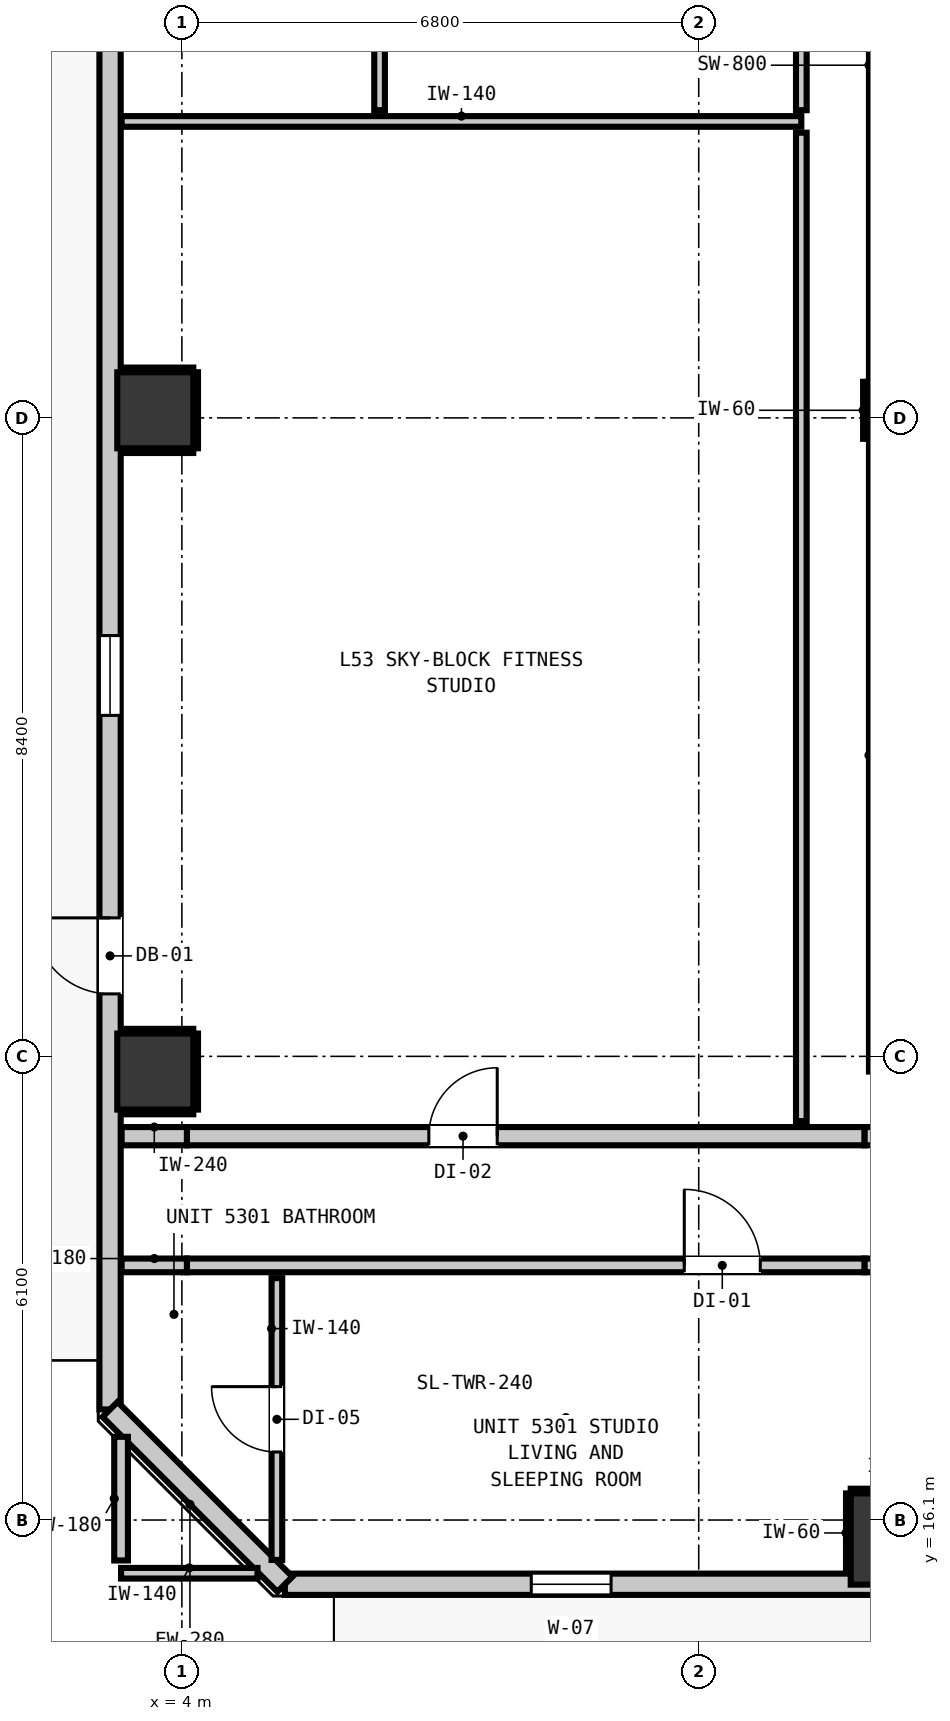
"""IFC4 building model, lengths in metres.
Left out: names, types, materials, properties, quantities, classifications, styles, units other than length and angle.
Written with IfcOpenShell. Run it as: python <this file> out.ifc"""

import sys

from ifc_helpers import new_model, si_unit, direction, frame, frame_2d, origin, origin_2d, place, context, subcontext, project, spatial, rectangle, extrude, element, fill, save


model = new_model("IFC4")
c1 = context("Model", 3, precision=1e-05, world=origin(), true_north=direction((0.0, 1.0)))
c2 = subcontext(c1, "Body", "Model", "MODEL_VIEW")
j1 = project(units=[si_unit("LENGTHUNIT", "METRE"), si_unit("PLANEANGLEUNIT", "RADIAN")], contexts=[c1])
p1 = place(None, origin())
s1 = spatial("IfcSite", under=j1, at=p1, CompositionType="ELEMENT")
p2 = place(p1, origin())
s2 = spatial("IfcBuilding", under=s1, at=p2, CompositionType="ELEMENT")
p3 = place(p2, frame((0.0, 0.0, 183.52)))
s3 = spatial("IfcBuildingStorey", under=s2, at=p3, CompositionType="ELEMENT", Elevation=183.52)
p4 = place(p3, frame((13.4, 30.7, 0.0), z_axis=(0.0, 0.0, 1.0), x_axis=(1.0, 0.0, 0.0)))
e1 = element("IfcColumn", 1, at=p4, inside=s3, PredefinedType="COLUMN", context=c2, shape_type="SweptSolid", body=[
    extrude(rectangle(XDim=0.75, YDim=0.75, at=origin_2d()), origin(), (0.0, 0.0, 1.0), 3.32),
])
p5 = place(p3, frame((13.44, 22.0, 0.0), z_axis=(0.0, 0.0, 1.0), x_axis=(0.0, 1.0, 0.0)))
e2 = element("IfcWall", 2, at=p5, inside=s3, PredefinedType="SHEAR", context=c2, shape_type="SweptSolid", body=[
    extrude(rectangle(XDim=8.32, YDim=0.8, at=frame_2d((4.16, 0.0))), origin(), (0.0, 0.0, 1.0), 3.32),
])
p6 = place(p3, frame((13.44, 31.08, 0.0), z_axis=(0.0, 0.0, 1.0), x_axis=(0.0, 1.0, 0.0)))
e3 = element("IfcWall", 3, at=p6, inside=s3, PredefinedType="SHEAR", context=c2, shape_type="SweptSolid", body=[
    extrude(rectangle(XDim=8.32, YDim=0.8, at=frame_2d((4.16, 0.0))), origin(), (0.0, 0.0, 1.0), 3.32),
])
p7 = place(p3, frame((13.4, 15.85, 0.0), z_axis=(0.0, 0.0, 1.0), x_axis=(1.0, 0.0, 0.0)))
e4 = element("IfcColumn", 4, at=p7, inside=s3, PredefinedType="COLUMN", context=c2, shape_type="SweptSolid", body=[
    extrude(rectangle(XDim=1.2, YDim=1.2, at=origin_2d()), origin(), (0.0, 0.0, 1.0), 3.32),
])
for number, where, z_axis, x_axis in (
    (5, (3.65, 22.0, 0.0), (0.0, 0.0, 1.0), (1.0, 0.0, 0.0)),
    (6, (3.65, 30.7, 0.0), (0.0, 0.0, 1.0), (1.0, 0.0, 0.0)),
):
    element("IfcColumn", number, at=place(p3, frame(where, z_axis=z_axis, x_axis=x_axis)), inside=s3, PredefinedType="COLUMN", context=c2, shape_type="SweptSolid", body=[
        extrude(rectangle(XDim=1.0, YDim=1.0, at=origin_2d()), origin(), (0.0, 0.0, 1.0), 3.32),
    ])
p8 = place(p3, frame((3.055, 17.555, 0.0), z_axis=(0.0, 0.0, 1.0), x_axis=(0.0, 1.0, 0.0)))
e7 = element("IfcWall", 7, at=p8, inside=s3, PredefinedType="STANDARD", context=c2, shape_type="SweptSolid", body=[
    extrude(rectangle(XDim=32.29, YDim=0.28, at=frame_2d((16.145, 0.0))), origin(), (0.0, 0.0, 1.0), 3.08),
])
p9 = place(p8, frame((5.467, 0.0, 0.0)))
e8 = element("IfcOpeningElement", 8, at=p9, cuts=e7, PredefinedType="OPENING", context=c2, shape_type="SweptSolid", body=[
    extrude(rectangle(XDim=1.0, YDim=2.15, at=frame_2d((0.5, 1.075))), frame((0.0, 0.15, 0.0), z_axis=(0.0, -1.0, 0.0), x_axis=(1.0, 0.0, 0.0)), (0.0, 0.0, 1.0), 0.3),
])
p10 = place(p8, frame((30.247, 0.0, 0.85)))
e9 = element("IfcOpeningElement", 9, at=p10, cuts=e7, PredefinedType="OPENING", context=c2, shape_type="SweptSolid", body=[
    extrude(rectangle(XDim=1.05, YDim=1.65, at=frame_2d((0.525, 0.825))), frame((0.0, 0.15, 0.0), z_axis=(0.0, -1.0, 0.0), x_axis=(1.0, 0.0, 0.0)), (0.0, 0.0, 1.0), 0.3),
])
p11 = place(p8, frame((9.131, 0.0, 0.85)))
e10 = element("IfcOpeningElement", 10, at=p11, cuts=e7, PredefinedType="OPENING", context=c2, shape_type="SweptSolid", body=[
    extrude(rectangle(XDim=1.05, YDim=1.65, at=frame_2d((0.525, 0.825))), frame((0.0, 0.15, 0.0), z_axis=(0.0, -1.0, 0.0), x_axis=(1.0, 0.0, 0.0)), (0.0, 0.0, 1.0), 0.3),
])
p12 = place(p3, frame((40.445, 15.255, 0.0), z_axis=(0.0, 0.0, 1.0), x_axis=(-1.0, 0.0, 0.0)))
e11 = element("IfcWall", 11, at=p12, inside=s3, PredefinedType="STANDARD", context=c2, shape_type="SweptSolid", body=[
    extrude(rectangle(XDim=35.09, YDim=0.28, at=frame_2d((17.545, 0.0))), origin(), (0.0, 0.0, 1.0), 3.08),
])
p13 = place(p12, frame((0.904, 0.0, 0.0)))
e12 = element("IfcOpeningElement", 12, at=p13, cuts=e11, PredefinedType="OPENING", context=c2, shape_type="SweptSolid", body=[
    extrude(rectangle(XDim=1.0, YDim=2.15, at=frame_2d((0.5, 1.075))), frame((0.0, 0.15, 0.0), z_axis=(0.0, -1.0, 0.0), x_axis=(1.0, 0.0, 0.0)), (0.0, 0.0, 1.0), 0.3),
])
p14 = place(p12, frame((30.798, 0.0, 0.85)))
e13 = element("IfcOpeningElement", 13, at=p14, cuts=e11, PredefinedType="OPENING", context=c2, shape_type="SweptSolid", body=[
    extrude(rectangle(XDim=1.05, YDim=1.65, at=frame_2d((0.525, 0.825))), frame((0.0, 0.15, 0.0), z_axis=(0.0, -1.0, 0.0), x_axis=(1.0, 0.0, 0.0)), (0.0, 0.0, 1.0), 0.3),
])
p15 = place(p12, frame((14.92, 0.0, 0.85)))
e14 = element("IfcOpeningElement", 14, at=p15, cuts=e11, PredefinedType="OPENING", context=c2, shape_type="SweptSolid", body=[
    extrude(rectangle(XDim=1.05, YDim=1.65, at=frame_2d((0.525, 0.825))), frame((0.0, 0.15, 0.0), z_axis=(0.0, -1.0, 0.0), x_axis=(1.0, 0.0, 0.0)), (0.0, 0.0, 1.0), 0.3),
])
p16 = place(p3, frame((5.355, 15.255, 0.0), z_axis=(0.0, 0.0, 1.0), x_axis=(-0.707106781187, 0.707106781187, 0.0)))
e15 = element("IfcWall", 15, at=p16, inside=s3, PredefinedType="STANDARD", context=c2, shape_type="SweptSolid", body=[
    extrude(rectangle(XDim=3.253, YDim=0.28, at=frame_2d((1.626, 0.0))), origin(), (0.0, 0.0, 1.0), 3.08),
])
p17 = place(p3, frame((3.207, 21.15, 0.0), z_axis=(0.0, 0.0, 1.0), x_axis=(1.0, 0.0, 0.0)))
e16 = element("IfcWall", 16, at=p17, inside=s3, PredefinedType="PARTITIONING", context=c2, shape_type="SweptSolid", body=[
    extrude(rectangle(XDim=0.86, YDim=0.24, at=frame_2d((0.43, 0.0))), origin(), (0.0, 0.0, 1.0), 3.08),
])
p18 = place(p3, frame((4.067, 21.15, 0.0), z_axis=(0.0, 0.0, 1.0), x_axis=(1.0, 0.0, 0.0)))
e17 = element("IfcWall", 17, at=p18, inside=s3, PredefinedType="PARTITIONING", context=c2, shape_type="SweptSolid", body=[
    extrude(rectangle(XDim=8.916, YDim=0.24, at=frame_2d((4.458, 0.0))), origin(), (0.0, 0.0, 1.0), 2.565),
])
p19 = place(p18, frame((3.182, 0.0, 0.0)))
e18 = element("IfcOpeningElement", 18, at=p19, cuts=e17, PredefinedType="OPENING", context=c2, shape_type="SweptSolid", body=[
    extrude(rectangle(XDim=0.9, YDim=2.1, at=frame_2d((0.45, 1.05))), frame((0.0, 0.13, 0.0), z_axis=(0.0, -1.0, 0.0), x_axis=(1.0, 0.0, 0.0)), (0.0, 0.0, 1.0), 0.26),
])
p20 = place(p3, frame((12.983, 21.15, 0.0), z_axis=(0.0, 0.0, 1.0), x_axis=(1.0, 0.0, 0.0)))
e19 = element("IfcWall", 19, at=p20, inside=s3, PredefinedType="PARTITIONING", context=c2, shape_type="SweptSolid", body=[
    extrude(rectangle(XDim=29.61, YDim=0.24, at=frame_2d((14.805, 0.0))), origin(), (0.0, 0.0, 1.0), 3.08),
])
p21 = place(p20, frame((5.227, 0.0, 0.0)))
e20 = element("IfcOpeningElement", 20, at=p21, cuts=e19, PredefinedType="OPENING", context=c2, shape_type="SweptSolid", body=[
    extrude(rectangle(XDim=1.1, YDim=2.15, at=frame_2d((0.55, 1.075))), frame((0.0, 0.13, 0.0), z_axis=(0.0, -1.0, 0.0), x_axis=(1.0, 0.0, 0.0)), (0.0, 0.0, 1.0), 0.26),
])
p22 = place(p20, frame((26.668, 0.0, 0.0)))
e21 = element("IfcOpeningElement", 21, at=p22, cuts=e19, PredefinedType="OPENING", context=c2, shape_type="SweptSolid", body=[
    extrude(rectangle(XDim=1.0, YDim=2.15, at=frame_2d((0.5, 1.075))), frame((0.0, 0.13, 0.0), z_axis=(0.0, -1.0, 0.0), x_axis=(1.0, 0.0, 0.0)), (0.0, 0.0, 1.0), 0.26),
])
p23 = place(p3, frame((3.207, 19.45, 0.0), z_axis=(0.0, 0.0, 1.0), x_axis=(1.0, 0.0, 0.0)))
e22 = element("IfcWall", 22, at=p23, inside=s3, PredefinedType="PARTITIONING", context=c2, shape_type="SweptSolid", body=[
    extrude(rectangle(XDim=0.86, YDim=0.18, at=frame_2d((0.43, 0.0))), origin(), (0.0, 0.0, 1.0), 3.08),
])
p24 = place(p3, frame((4.067, 19.45, 0.0), z_axis=(0.0, 0.0, 1.0), x_axis=(1.0, 0.0, 0.0)))
e23 = element("IfcWall", 23, at=p24, inside=s3, PredefinedType="PARTITIONING", context=c2, shape_type="SweptSolid", body=[
    extrude(rectangle(XDim=8.916, YDim=0.18, at=frame_2d((4.458, 0.0))), origin(), (0.0, 0.0, 1.0), 2.565),
])
p25 = place(p24, frame((6.543, 0.0, 0.0)))
e24 = element("IfcOpeningElement", 24, at=p25, cuts=e23, PredefinedType="OPENING", context=c2, shape_type="SweptSolid", body=[
    extrude(rectangle(XDim=1.0, YDim=2.15, at=frame_2d((0.5, 1.075))), frame((0.0, 0.1, 0.0), z_axis=(0.0, -1.0, 0.0), x_axis=(1.0, 0.0, 0.0)), (0.0, 0.0, 1.0), 0.2),
])
p26 = place(p3, frame((12.983, 19.45, 0.0), z_axis=(0.0, 0.0, 1.0), x_axis=(1.0, 0.0, 0.0)))
e25 = element("IfcWall", 25, at=p26, inside=s3, PredefinedType="PARTITIONING", context=c2, shape_type="SweptSolid", body=[
    extrude(rectangle(XDim=29.61, YDim=0.18, at=frame_2d((14.805, 0.0))), origin(), (0.0, 0.0, 1.0), 3.08),
])
p27 = place(p26, frame((17.403, 0.0, 0.0)))
e26 = element("IfcOpeningElement", 26, at=p27, cuts=e25, PredefinedType="OPENING", context=c2, shape_type="SweptSolid", body=[
    extrude(rectangle(XDim=0.9, YDim=2.1, at=frame_2d((0.45, 1.05))), frame((0.0, 0.1, 0.0), z_axis=(0.0, -1.0, 0.0), x_axis=(1.0, 0.0, 0.0)), (0.0, 0.0, 1.0), 0.2),
])
p28 = place(p3, frame((3.2, 15.4, 0.0), z_axis=(0.0, 0.0, 1.0), x_axis=(1.0, 0.0, 0.0)))
e27 = element("IfcWall", 27, at=p28, inside=s3, PredefinedType="PARTITIONING", context=c2, shape_type="SweptSolid", body=[
    extrude(rectangle(XDim=1.795, YDim=0.14, at=frame_2d((0.897, 0.0))), origin(), (0.0, 0.0, 1.0), 3.08),
])
p29 = place(p3, frame((3.207, 34.5, 0.0), z_axis=(0.0, 0.0, 1.0), x_axis=(1.0, 0.0, 0.0)))
e28 = element("IfcWall", 28, at=p29, inside=s3, PredefinedType="PARTITIONING", context=c2, shape_type="SweptSolid", body=[
    extrude(rectangle(XDim=8.943, YDim=0.14, at=frame_2d((4.471, 0.0))), origin(), (0.0, 0.0, 1.0), 3.08),
])
p30 = place(p3, frame((3.2, 15.568, 0.0), z_axis=(0.0, 0.0, 1.0), x_axis=(0.0, 1.0, 0.0)))
e29 = element("IfcWall", 29, at=p30, inside=s3, PredefinedType="PARTITIONING", context=c2, shape_type="SweptSolid", body=[
    extrude(rectangle(XDim=1.627, YDim=0.18, at=frame_2d((0.813, 0.0))), origin(), (0.0, 0.0, 1.0), 3.08),
])
p31 = place(p3, frame((5.25, 15.575, 0.0), z_axis=(0.0, 0.0, 1.0), x_axis=(0.0, 1.0, 0.0)))
e30 = element("IfcWall", 30, at=p31, inside=s3, PredefinedType="PARTITIONING", context=c2, shape_type="SweptSolid", body=[
    extrude(rectangle(XDim=3.707, YDim=0.14, at=frame_2d((1.854, 0.0))), origin(), (0.0, 0.0, 1.0), 3.08),
])
p32 = place(p31, frame((1.42, 0.0, 0.0)))
e31 = element("IfcOpeningElement", 31, at=p32, cuts=e30, PredefinedType="OPENING", context=c2, shape_type="SweptSolid", body=[
    extrude(rectangle(XDim=0.86, YDim=2.02, at=frame_2d((0.43, 1.01))), frame((0.0, 0.08, 0.0), z_axis=(0.0, -1.0, 0.0), x_axis=(1.0, 0.0, 0.0)), (0.0, 0.0, 1.0), 0.16),
])
p33 = place(p3, frame((6.601, 34.648, 0.0), z_axis=(0.0, 0.0, 1.0), x_axis=(0.0, 1.0, 0.0)))
e32 = element("IfcWall", 32, at=p33, inside=s3, PredefinedType="PARTITIONING", context=c2, shape_type="SweptSolid", body=[
    extrude(rectangle(XDim=5.434, YDim=0.14, at=frame_2d((2.717, 0.0))), origin(), (0.0, 0.0, 1.0), 3.08),
])
p34 = place(p3, frame((12.15, 21.348, 0.0), z_axis=(0.0, 0.0, 1.0), x_axis=(0.0, 1.0, 0.0)))
e33 = element("IfcWall", 33, at=p34, inside=s3, PredefinedType="PARTITIONING", context=c2, shape_type="SweptSolid", body=[
    extrude(rectangle(XDim=13.004, YDim=0.14, at=frame_2d((6.502, 0.0))), origin(), (0.0, 0.0, 1.0), 3.08),
])
p35 = place(p3, frame((12.15, 34.648, 0.0), z_axis=(0.0, 0.0, 1.0), x_axis=(0.0, 1.0, 0.0)))
e34 = element("IfcWall", 34, at=p35, inside=s3, PredefinedType="PARTITIONING", context=c2, shape_type="SweptSolid", body=[
    extrude(rectangle(XDim=5.434, YDim=0.14, at=frame_2d((2.717, 0.0))), origin(), (0.0, 0.0, 1.0), 3.08),
])
p36 = place(p3, frame((12.993, 30.325, 0.0), z_axis=(0.0, 0.0, 1.0), x_axis=(0.0, 1.0, 0.0)))
e35 = element("IfcWall", 35, at=p36, inside=s3, PredefinedType="PARTITIONING", context=c2, shape_type="SweptSolid", body=[
    extrude(rectangle(XDim=0.75, YDim=0.06, at=frame_2d((0.375, 0.0))), origin(), (0.0, 0.0, 1.0), 1.45),
])
p37 = place(p3, frame((12.8, 16.482, 0.0), z_axis=(0.0, 0.0, 1.0), x_axis=(1.0, 0.0, 0.0)))
e36 = element("IfcWall", 36, at=p37, inside=s3, PredefinedType="PARTITIONING", context=c2, shape_type="SweptSolid", body=[
    extrude(rectangle(XDim=1.2, YDim=0.06, at=frame_2d((0.6, 0.0))), origin(), (0.0, 0.0, 1.0), 1.45),
])
p38 = place(p3, frame((12.768, 15.41, 0.0), z_axis=(0.0, 0.0, 1.0), x_axis=(0.0, 1.0, 0.0)))
e37 = element("IfcWall", 37, at=p38, inside=s3, PredefinedType="PARTITIONING", context=c2, shape_type="SweptSolid", body=[
    extrude(rectangle(XDim=1.04, YDim=0.06, at=frame_2d((0.52, 0.0))), origin(), (0.0, 0.0, 1.0), 1.45),
])
for number, where, z_axis, x_axis in (
    (38, (3.21, 21.468, 0.0), (0.0, 0.0, 1.0), (1.0, 0.0, 0.0)),
    (39, (3.21, 22.532, 0.0), (0.0, 0.0, 1.0), (1.0, 0.0, 0.0)),
):
    element("IfcWall", number, at=place(p3, frame(where, z_axis=z_axis, x_axis=x_axis)), inside=s3, PredefinedType="PARTITIONING", context=c2, shape_type="SweptSolid", body=[
        extrude(rectangle(XDim=0.94, YDim=0.06, at=frame_2d((0.47, 0.0))), origin(), (0.0, 0.0, 1.0), 1.45),
    ])
p39 = place(p3, frame((4.182, 21.5, 0.0), z_axis=(0.0, 0.0, 1.0), x_axis=(0.0, 1.0, 0.0)))
e40 = element("IfcWall", 40, at=p39, inside=s3, PredefinedType="PARTITIONING", context=c2, shape_type="SweptSolid", body=[
    extrude(rectangle(XDim=1.0, YDim=0.06, at=frame_2d((0.5, 0.0))), origin(), (0.0, 0.0, 1.0), 1.45),
])
for number, where, z_axis, x_axis in (
    (41, (3.21, 30.168, 0.0), (0.0, 0.0, 1.0), (1.0, 0.0, 0.0)),
    (42, (3.21, 31.232, 0.0), (0.0, 0.0, 1.0), (1.0, 0.0, 0.0)),
):
    element("IfcWall", number, at=place(p3, frame(where, z_axis=z_axis, x_axis=x_axis)), inside=s3, PredefinedType="PARTITIONING", context=c2, shape_type="SweptSolid", body=[
        extrude(rectangle(XDim=0.94, YDim=0.06, at=frame_2d((0.47, 0.0))), origin(), (0.0, 0.0, 1.0), 1.45),
    ])
p40 = place(p3, frame((4.182, 30.2, 0.0), z_axis=(0.0, 0.0, 1.0), x_axis=(0.0, 1.0, 0.0)))
e43 = element("IfcWall", 43, at=p40, inside=s3, PredefinedType="PARTITIONING", context=c2, shape_type="SweptSolid", body=[
    extrude(rectangle(XDim=1.0, YDim=0.06, at=frame_2d((0.5, 0.0))), origin(), (0.0, 0.0, 1.0), 1.45),
])
p41 = place(p9, origin())
e44 = element("IfcDoor", 44, at=p41, inside=s3, OperationType="SINGLE_SWING_RIGHT", PredefinedType="DOOR", context=c2, shape_type="SweptSolid", body=[
    extrude(rectangle(XDim=1.0, YDim=2.15, at=frame_2d((0.5, 1.075))), frame((0.0, 0.025, 0.0), z_axis=(0.0, -1.0, 0.0), x_axis=(1.0, 0.0, 0.0)), (0.0, 0.0, 1.0), 0.05),
])
fill(e8, e44)
p42 = place(p11, origin())
e45 = element("IfcWindow", 45, at=p42, inside=s3, PartitioningType="SINGLE_PANEL", PredefinedType="WINDOW", context=c2, shape_type="SweptSolid", body=[
    extrude(rectangle(XDim=1.05, YDim=1.65, at=frame_2d((0.525, 0.825))), frame((0.0, 0.03, 0.0), z_axis=(0.0, -1.0, 0.0), x_axis=(1.0, 0.0, 0.0)), (0.0, 0.0, 1.0), 0.06),
])
fill(e10, e45)
p43 = place(p14, origin())
e46 = element("IfcWindow", 46, at=p43, inside=s3, PartitioningType="SINGLE_PANEL", PredefinedType="WINDOW", context=c2, shape_type="SweptSolid", body=[
    extrude(rectangle(XDim=1.05, YDim=1.65, at=frame_2d((0.525, 0.825))), frame((0.0, 0.03, 0.0), z_axis=(0.0, -1.0, 0.0), x_axis=(1.0, 0.0, 0.0)), (0.0, 0.0, 1.0), 0.06),
])
fill(e13, e46)
p44 = place(p25, origin())
e47 = element("IfcDoor", 47, at=p44, inside=s3, OperationType="SINGLE_SWING_LEFT", PredefinedType="DOOR", context=c2, shape_type="SweptSolid", body=[
    extrude(rectangle(XDim=1.0, YDim=2.15, at=frame_2d((0.5, 1.075))), frame((0.0, 0.025, 0.0), z_axis=(0.0, -1.0, 0.0), x_axis=(1.0, 0.0, 0.0)), (0.0, 0.0, 1.0), 0.05),
])
fill(e24, e47)
p45 = place(p32, origin())
e48 = element("IfcDoor", 48, at=p45, inside=s3, OperationType="SINGLE_SWING_RIGHT", PredefinedType="DOOR", context=c2, shape_type="SweptSolid", body=[
    extrude(rectangle(XDim=0.86, YDim=2.02, at=frame_2d((0.43, 1.01))), frame((0.0, 0.025, 0.0), z_axis=(0.0, -1.0, 0.0), x_axis=(1.0, 0.0, 0.0)), (0.0, 0.0, 1.0), 0.05),
])
fill(e31, e48)
p46 = place(p19, origin())
e49 = element("IfcDoor", 49, at=p46, inside=s3, OperationType="SINGLE_SWING_RIGHT", PredefinedType="DOOR", context=c2, shape_type="SweptSolid", body=[
    extrude(rectangle(XDim=0.9, YDim=2.1, at=frame_2d((0.45, 1.05))), frame((0.0, 0.025, 0.0), z_axis=(0.0, -1.0, 0.0), x_axis=(1.0, 0.0, 0.0)), (0.0, 0.0, 1.0), 0.05),
])
fill(e18, e49)
save(model, sys.argv[1])
